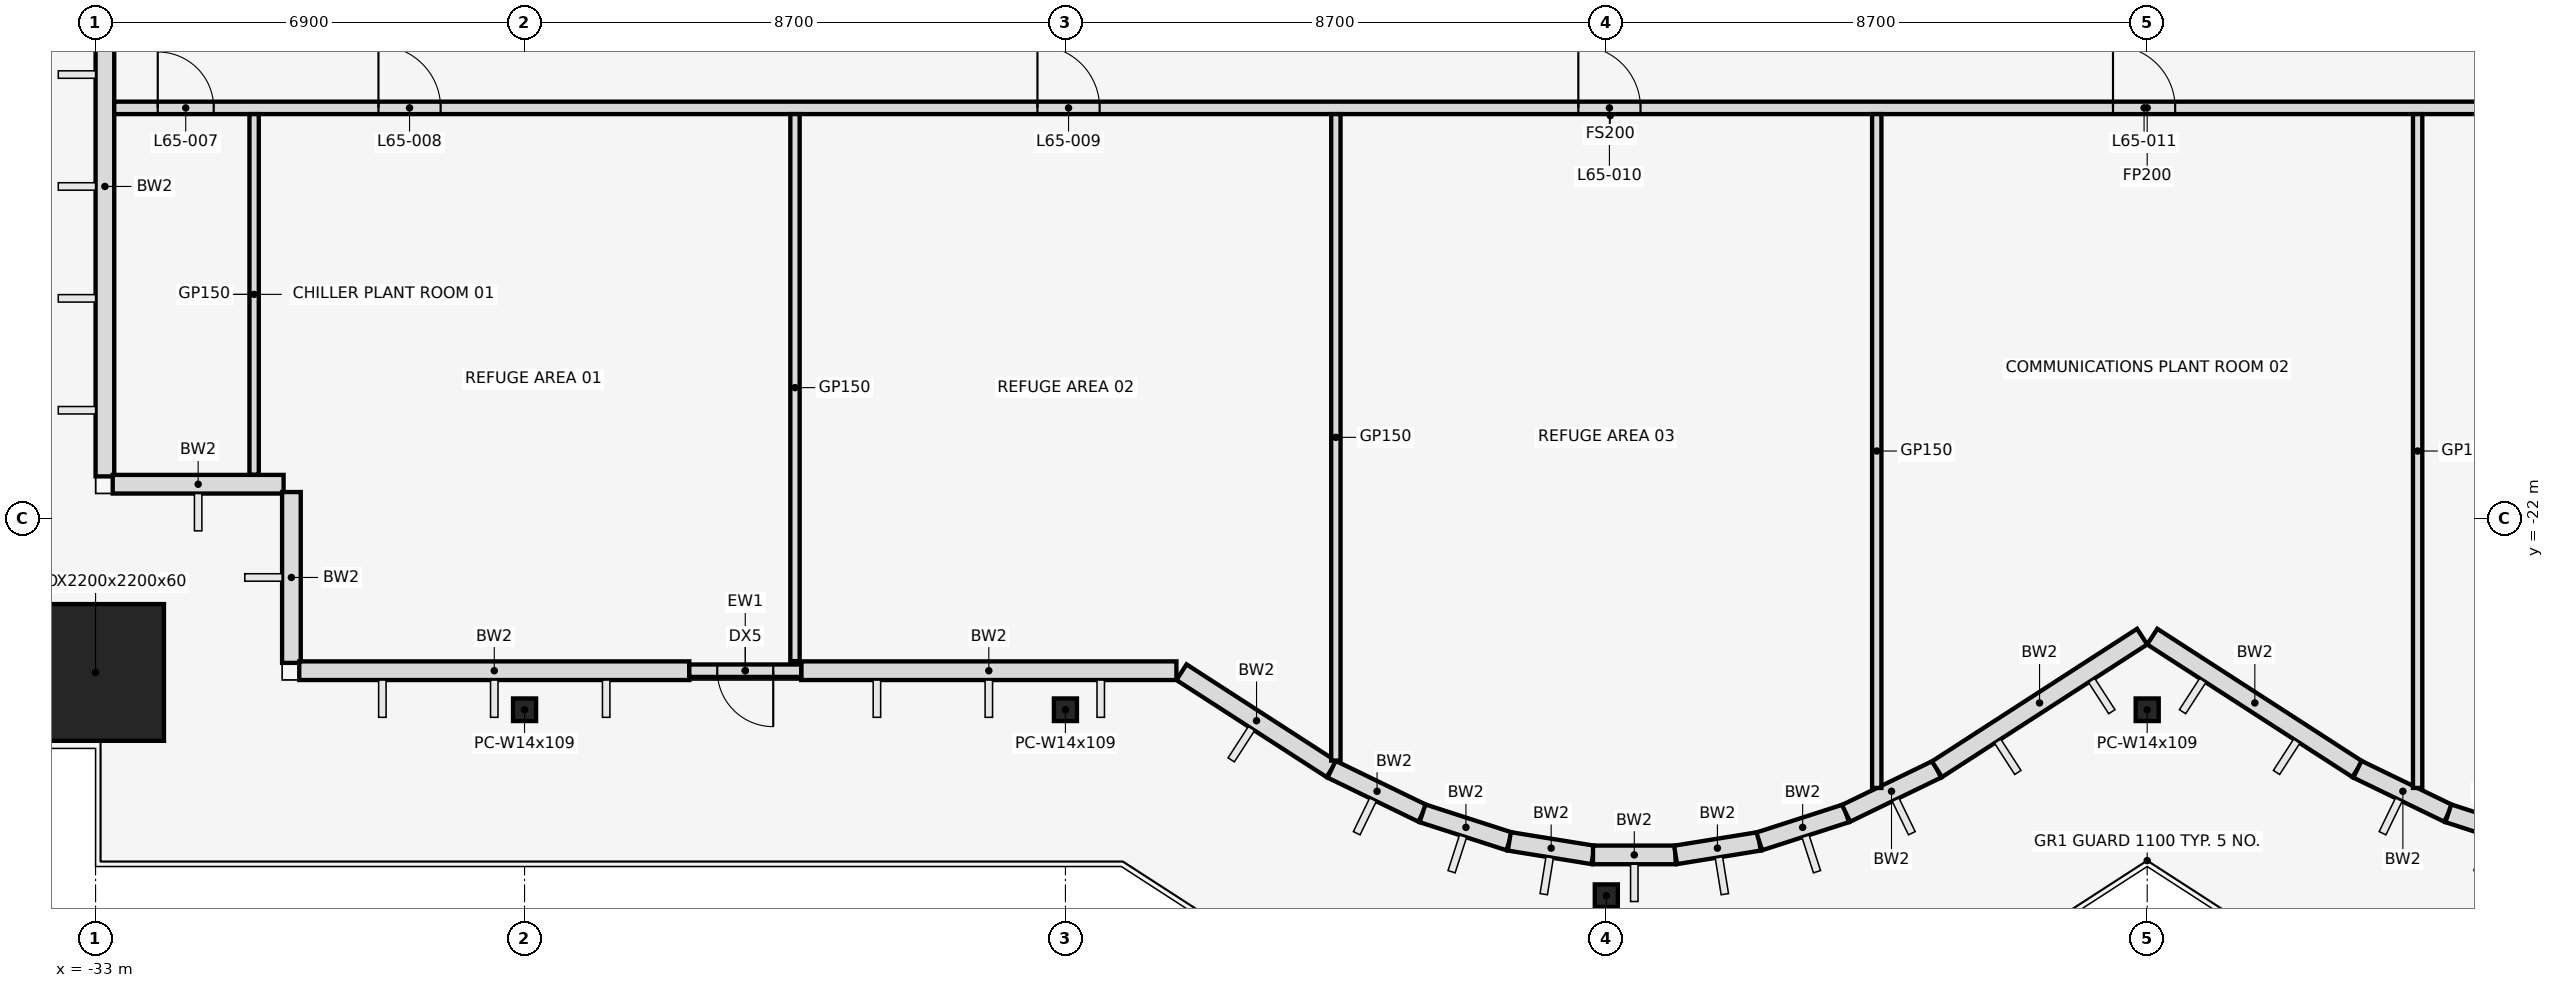
"""IFC4 building model, lengths in metres.
Left out: names, types, materials, properties, quantities, classifications, styles, units other than length and angle.
Written with IfcOpenShell. Run it as: python <this file> out.ifc"""

import sys

from ifc_helpers import new_model, si_unit, direction, frame, frame_2d, origin, origin_2d, place, context, subcontext, project, spatial, rectangle, hollow_rectangle, i_section, extrude, element, fill, save


model = new_model("IFC4")
c1 = context("Model", 3, precision=1e-05, world=origin(), true_north=direction((0.0, 1.0)))
c2 = subcontext(c1, "Body", "Model", "MODEL_VIEW")
j1 = project(units=[si_unit("LENGTHUNIT", "METRE"), si_unit("PLANEANGLEUNIT", "RADIAN")], contexts=[c1])
p1 = place(None, origin())
s1 = spatial("IfcSite", under=j1, at=p1, CompositionType="ELEMENT")
p2 = place(p1, origin())
s2 = spatial("IfcBuilding", under=s1, at=p2, CompositionType="ELEMENT")
p3 = place(p2, frame((0.0, 0.0, 287.6)))
s3 = spatial("IfcBuildingStorey", under=s2, at=p3, CompositionType="ELEMENT", Elevation=287.6)
p4 = place(p3, frame((-33.0, -24.482, 0.0), z_axis=(0.0, 0.0, 1.0), x_axis=(1.0, 0.0, 0.0)))
e1 = element("IfcColumn", 1, at=p4, inside=s3, PredefinedType="COLUMN", context=c2, shape_type="SweptSolid", body=[
    extrude(hollow_rectangle(XDim=2.2, YDim=2.2, WallThickness=0.06, at=origin_2d()), origin(), (0.0, 0.0, 1.0), 5.4),
])
for number, where, z_axis, x_axis in (
    (2, (-26.1, -25.082, 0.0), (0.0, 0.0, 1.0), (1.0, 0.0, 0.0)),
    (3, (-17.4, -25.082, 0.0), (0.0, 0.0, 1.0), (1.0, 0.0, 0.0)),
    (4, (-8.7, -28.073, 0.0), (0.0, 0.0, 1.0), (1.0, 0.0, 0.0)),
    (5, (0.0, -25.082, 0.0), (0.0, 0.0, 1.0), (1.0, 0.0, 0.0)),
):
    element("IfcColumn", number, at=place(p3, frame(where, z_axis=z_axis, x_axis=x_axis)), inside=s3, PredefinedType="COLUMN", context=c2, shape_type="SweptSolid", body=[
        extrude(i_section(OverallWidth=0.371, OverallDepth=0.363, WebThickness=0.013, FlangeThickness=0.022, at=origin_2d()), origin(), (0.0, 0.0, 1.0), 5.4),
    ])
p5 = place(p3, frame((-32.85, -12.0, 0.0), z_axis=(0.0, 0.0, 1.0), x_axis=(0.0, -1.0, 0.0)))
e6 = element("IfcWall", 6, at=p5, inside=s3, PredefinedType="STANDARD", context=c2, shape_type="SweptSolid", body=[
    extrude(rectangle(XDim=9.328, YDim=0.3, at=frame_2d((4.664, 0.0))), origin(), (0.0, 0.0, 1.0), 4.338),
])
for number, where, z_axis, x_axis in (
    (7, (-32.724, -21.454, 0.0), (0.0, 0.0, 1.0), (1.0, 0.0, 0.0)),
    (8, (-29.85, -21.58, 0.0), (0.0, 0.0, 1.0), (0.0, -1.0, 0.0)),
):
    element("IfcWall", number, at=place(p3, frame(where, z_axis=z_axis, x_axis=x_axis)), inside=s3, PredefinedType="STANDARD", context=c2, shape_type="SweptSolid", body=[
        extrude(rectangle(XDim=2.748, YDim=0.3, at=frame_2d((1.374, 0.0))), origin(), (0.0, 0.0, 1.0), 4.65),
    ])
p6 = place(p3, frame((-29.724, -24.454, 0.0), z_axis=(0.0, 0.0, 1.0), x_axis=(1.0, 0.0, 0.0)))
e9 = element("IfcWall", 9, at=p6, inside=s3, PredefinedType="STANDARD", context=c2, shape_type="SweptSolid", body=[
    extrude(rectangle(XDim=6.274, YDim=0.3, at=frame_2d((3.137, 0.0))), origin(), (0.0, 0.0, 1.0), 4.65),
])
p7 = place(p3, frame((-21.65, -24.454, 0.0), z_axis=(0.0, 0.0, 1.0), x_axis=(1.0, 0.0, 0.0)))
e10 = element("IfcWall", 10, at=p7, inside=s3, PredefinedType="STANDARD", context=c2, shape_type="SweptSolid", body=[
    extrude(rectangle(XDim=6.035, YDim=0.3, at=frame_2d((3.018, 0.0))), origin(), (0.0, 0.0, 1.0), 4.65),
])
p8 = place(p3, frame((-15.533, -24.478, 0.0), z_axis=(0.0, 0.0, 1.0), x_axis=(0.839779682339, -0.542927329512, 0.0)))
e11 = element("IfcWall", 11, at=p8, inside=s3, PredefinedType="STANDARD", context=c2, shape_type="SweptSolid", body=[
    extrude(rectangle(XDim=2.875, YDim=0.3, at=frame_2d((1.438, 0.0))), origin(), (0.0, 0.0, 1.0), 4.572),
])
p9 = place(p3, frame((-13.119, -26.039, 0.0), z_axis=(0.0, 0.0, 1.0), x_axis=(0.899798026589, -0.436306671214, 0.0)))
e12 = element("IfcWall", 12, at=p9, inside=s3, PredefinedType="STANDARD", context=c2, shape_type="SweptSolid", body=[
    extrude(rectangle(XDim=1.625, YDim=0.3, at=frame_2d((0.813, 0.0))), origin(), (0.0, 0.0, 1.0), 4.572),
])
p10 = place(p3, frame((-11.656, -26.748, 0.0), z_axis=(0.0, 0.0, 1.0), x_axis=(0.951539081691, -0.307527845919, 0.0)))
e13 = element("IfcWall", 13, at=p10, inside=s3, PredefinedType="STANDARD", context=c2, shape_type="SweptSolid", body=[
    extrude(rectangle(XDim=1.467, YDim=0.3, at=frame_2d((0.733, 0.0))), origin(), (0.0, 0.0, 1.0), 5.25),
])
p11 = place(p3, frame((-10.26, -27.199, 0.0), z_axis=(0.0, 0.0, 1.0), x_axis=(0.987194777017, -0.15951950423, 0.0)))
e14 = element("IfcWall", 14, at=p11, inside=s3, PredefinedType="STANDARD", context=c2, shape_type="SweptSolid", body=[
    extrude(rectangle(XDim=1.364, YDim=0.3, at=frame_2d((0.682, 0.0))), origin(), (0.0, 0.0, 1.0), 5.25),
])
p12 = place(p3, frame((-8.914, -27.417, 0.0), z_axis=(0.0, 0.0, 1.0), x_axis=(1.0, 0.0, 0.0)))
e15 = element("IfcWall", 15, at=p12, inside=s3, PredefinedType="STANDARD", context=c2, shape_type="SweptSolid", body=[
    extrude(rectangle(XDim=1.328, YDim=0.3, at=frame_2d((0.664, 0.0))), origin(), (0.0, 0.0, 1.0), 5.25),
])
p13 = place(p3, frame((-7.586, -27.417, 0.0), z_axis=(0.0, 0.0, 1.0), x_axis=(0.987194777017, 0.15951950423, 0.0)))
e16 = element("IfcWall", 16, at=p13, inside=s3, PredefinedType="STANDARD", context=c2, shape_type="SweptSolid", body=[
    extrude(rectangle(XDim=1.364, YDim=0.3, at=frame_2d((0.682, 0.0))), origin(), (0.0, 0.0, 1.0), 5.25),
])
p14 = place(p3, frame((-6.24, -27.199, 0.0), z_axis=(0.0, 0.0, 1.0), x_axis=(0.951539081691, 0.307527845919, 0.0)))
e17 = element("IfcWall", 17, at=p14, inside=s3, PredefinedType="STANDARD", context=c2, shape_type="SweptSolid", body=[
    extrude(rectangle(XDim=1.467, YDim=0.3, at=frame_2d((0.733, 0.0))), origin(), (0.0, 0.0, 1.0), 5.25),
])
p15 = place(p3, frame((-4.844, -26.748, 0.0), z_axis=(0.0, 0.0, 1.0), x_axis=(0.899798026589, 0.436306671214, 0.0)))
e18 = element("IfcWall", 18, at=p15, inside=s3, PredefinedType="STANDARD", context=c2, shape_type="SweptSolid", body=[
    extrude(rectangle(XDim=1.625, YDim=0.3, at=frame_2d((0.813, 0.0))), origin(), (0.0, 0.0, 1.0), 4.572),
])
for number, where, z_axis, x_axis in (
    (19, (-3.381, -26.039, 0.0), (0.0, 0.0, 1.0), (0.84, 0.543, 0.0)),
    (20, (0.081, -23.906, 0.0), (0.0, 0.0, 1.0), (0.84, -0.543, 0.0)),
):
    element("IfcWall", number, at=place(p3, frame(where, z_axis=z_axis, x_axis=x_axis)), inside=s3, PredefinedType="STANDARD", context=c2, shape_type="SweptSolid", body=[
        extrude(rectangle(XDim=3.929, YDim=0.3, at=frame_2d((1.965, 0.0))), origin(), (0.0, 0.0, 1.0), 4.65),
    ])
p16 = place(p3, frame((3.381, -26.039, 0.0), z_axis=(0.0, 0.0, 1.0), x_axis=(0.899798026589, -0.436306671214, 0.0)))
e21 = element("IfcWall", 21, at=p16, inside=s3, PredefinedType="STANDARD", context=c2, shape_type="SweptSolid", body=[
    extrude(rectangle(XDim=1.625, YDim=0.3, at=frame_2d((0.813, 0.0))), origin(), (0.0, 0.0, 1.0), 4.572),
])
p17 = place(p3, frame((4.844, -26.748, 0.0), z_axis=(0.0, 0.0, 1.0), x_axis=(0.951539081691, -0.307527845919, 0.0)))
e22 = element("IfcWall", 22, at=p17, inside=s3, PredefinedType="STANDARD", context=c2, shape_type="SweptSolid", body=[
    extrude(rectangle(XDim=1.467, YDim=0.3, at=frame_2d((0.733, 0.0))), origin(), (0.0, 0.0, 1.0), 5.25),
])
p18 = place(p3, frame((-21.65, -24.454, 0.0), z_axis=(0.0, 0.0, 1.0), x_axis=(-1.0, 0.0, 0.0)))
e23 = element("IfcWall", 23, at=p18, inside=s3, PredefinedType="STANDARD", context=c2, shape_type="SweptSolid", body=[
    extrude(rectangle(XDim=1.8, YDim=0.2, at=frame_2d((0.9, 0.0))), origin(), (0.0, 0.0, 1.0), 5.25),
])
p19 = place(p18, frame((0.45, 0.0, 0.0)))
e24 = element("IfcOpeningElement", 24, at=p19, cuts=e23, PredefinedType="OPENING", context=c2, shape_type="SweptSolid", body=[
    extrude(rectangle(XDim=0.9, YDim=2.1, at=frame_2d((0.45, 1.05))), frame((0.0, 0.112, 0.0), z_axis=(0.0, -1.0, 0.0), x_axis=(1.0, 0.0, 0.0)), (0.0, 0.0, 1.0), 0.224),
])
p20 = place(p3, frame((-32.7, -15.4, 0.0), z_axis=(0.0, 0.0, 1.0), x_axis=(1.0, 0.0, 0.0)))
e25 = element("IfcWall", 25, at=p20, inside=s3, PredefinedType="PARTITIONING", context=c2, shape_type="SweptSolid", body=[
    extrude(rectangle(XDim=65.4, YDim=0.2, at=frame_2d((32.7, 0.0))), origin(), (0.0, 0.0, 1.0), 4.318),
])
p21 = place(p20, frame((0.7, 0.0, 0.0)))
e26 = element("IfcOpeningElement", 26, at=p21, cuts=e25, PredefinedType="OPENING", context=c2, shape_type="SweptSolid", body=[
    extrude(rectangle(XDim=0.9, YDim=2.1, at=frame_2d((0.45, 1.05))), frame((0.0, 0.112, 0.0), z_axis=(0.0, -1.0, 0.0), x_axis=(1.0, 0.0, 0.0)), (0.0, 0.0, 1.0), 0.224),
])
p22 = place(p20, frame((4.25, 0.0, 0.0)))
e27 = element("IfcOpeningElement", 27, at=p22, cuts=e25, PredefinedType="OPENING", context=c2, shape_type="SweptSolid", body=[
    extrude(rectangle(XDim=1.0, YDim=2.1, at=frame_2d((0.5, 1.05))), frame((0.0, 0.112, 0.0), z_axis=(0.0, -1.0, 0.0), x_axis=(1.0, 0.0, 0.0)), (0.0, 0.0, 1.0), 0.224),
])
p23 = place(p20, frame((14.85, 0.0, 0.0)))
e28 = element("IfcOpeningElement", 28, at=p23, cuts=e25, PredefinedType="OPENING", context=c2, shape_type="SweptSolid", body=[
    extrude(rectangle(XDim=1.0, YDim=2.1, at=frame_2d((0.5, 1.05))), frame((0.0, 0.112, 0.0), z_axis=(0.0, -1.0, 0.0), x_axis=(1.0, 0.0, 0.0)), (0.0, 0.0, 1.0), 0.224),
])
p24 = place(p20, frame((23.55, 0.0, 0.0)))
e29 = element("IfcOpeningElement", 29, at=p24, cuts=e25, PredefinedType="OPENING", context=c2, shape_type="SweptSolid", body=[
    extrude(rectangle(XDim=1.0, YDim=2.1, at=frame_2d((0.5, 1.05))), frame((0.0, 0.112, 0.0), z_axis=(0.0, -1.0, 0.0), x_axis=(1.0, 0.0, 0.0)), (0.0, 0.0, 1.0), 0.224),
])
p25 = place(p20, frame((32.15, 0.0, 0.0)))
e30 = element("IfcOpeningElement", 30, at=p25, cuts=e25, PredefinedType="OPENING", context=c2, shape_type="SweptSolid", body=[
    extrude(rectangle(XDim=1.0, YDim=2.1, at=frame_2d((0.5, 1.05))), frame((0.0, 0.112, 0.0), z_axis=(0.0, -1.0, 0.0), x_axis=(1.0, 0.0, 0.0)), (0.0, 0.0, 1.0), 0.224),
])
p26 = place(p20, frame((40.95, 0.0, 0.0)))
e31 = element("IfcOpeningElement", 31, at=p26, cuts=e25, PredefinedType="OPENING", context=c2, shape_type="SweptSolid", body=[
    extrude(rectangle(XDim=1.0, YDim=2.1, at=frame_2d((0.5, 1.05))), frame((0.0, 0.112, 0.0), z_axis=(0.0, -1.0, 0.0), x_axis=(1.0, 0.0, 0.0)), (0.0, 0.0, 1.0), 0.224),
])
p27 = place(p20, frame((49.65, 0.0, 0.0)))
e32 = element("IfcOpeningElement", 32, at=p27, cuts=e25, PredefinedType="OPENING", context=c2, shape_type="SweptSolid", body=[
    extrude(rectangle(XDim=0.9, YDim=2.1, at=frame_2d((0.45, 1.05))), frame((0.0, 0.112, 0.0), z_axis=(0.0, -1.0, 0.0), x_axis=(1.0, 0.0, 0.0)), (0.0, 0.0, 1.0), 0.224),
])
p28 = place(p20, frame((60.15, 0.0, 0.0)))
e33 = element("IfcOpeningElement", 33, at=p28, cuts=e25, PredefinedType="OPENING", context=c2, shape_type="SweptSolid", body=[
    extrude(rectangle(XDim=1.0, YDim=2.1, at=frame_2d((0.5, 1.05))), frame((0.0, 0.112, 0.0), z_axis=(0.0, -1.0, 0.0), x_axis=(1.0, 0.0, 0.0)), (0.0, 0.0, 1.0), 0.224),
])
p29 = place(p20, frame((63.85, 0.0, 0.0)))
e34 = element("IfcOpeningElement", 34, at=p29, cuts=e25, PredefinedType="OPENING", context=c2, shape_type="SweptSolid", body=[
    extrude(rectangle(XDim=0.9, YDim=2.1, at=frame_2d((0.45, 1.05))), frame((0.0, 0.112, 0.0), z_axis=(0.0, -1.0, 0.0), x_axis=(1.0, 0.0, 0.0)), (0.0, 0.0, 1.0), 0.224),
])
p30 = place(p3, frame((-30.45, -21.3, 0.0), z_axis=(0.0, 0.0, 1.0), x_axis=(0.0, 1.0, 0.0)))
e35 = element("IfcWall", 35, at=p30, inside=s3, PredefinedType="PARTITIONING", context=c2, shape_type="SweptSolid", body=[
    extrude(rectangle(XDim=5.8, YDim=0.15, at=frame_2d((2.9, 0.0))), origin(), (0.0, 0.0, 1.0), 4.318),
])
p31 = place(p3, frame((-21.75, -24.3, 0.0), z_axis=(0.0, 0.0, 1.0), x_axis=(0.0, 1.0, 0.0)))
e36 = element("IfcWall", 36, at=p31, inside=s3, PredefinedType="PARTITIONING", context=c2, shape_type="SweptSolid", body=[
    extrude(rectangle(XDim=8.8, YDim=0.15, at=frame_2d((4.4, 0.0))), origin(), (0.0, 0.0, 1.0), 4.318),
])
p32 = place(p3, frame((-13.05, -25.9, 0.0), z_axis=(0.0, 0.0, 1.0), x_axis=(0.0, 1.0, 0.0)))
e37 = element("IfcWall", 37, at=p32, inside=s3, PredefinedType="PARTITIONING", context=c2, shape_type="SweptSolid", body=[
    extrude(rectangle(XDim=10.4, YDim=0.15, at=frame_2d((5.2, 0.0))), origin(), (0.0, 0.0, 1.0), 4.318),
])
for number, where, z_axis, x_axis in (
    (38, (-4.35, -26.34, 0.0), (0.0, 0.0, 1.0), (0.0, 1.0, 0.0)),
    (39, (4.35, -26.34, 0.0), (0.0, 0.0, 1.0), (0.0, 1.0, 0.0)),
):
    element("IfcWall", number, at=place(p3, frame(where, z_axis=z_axis, x_axis=x_axis)), inside=s3, PredefinedType="PARTITIONING", context=c2, shape_type="SweptSolid", body=[
        extrude(rectangle(XDim=10.84, YDim=0.15, at=frame_2d((5.42, 0.0))), origin(), (0.0, 0.0, 1.0), 4.318),
    ])
p33 = place(p19, origin())
e40 = element("IfcDoor", 40, at=p33, inside=s3, OperationType="SINGLE_SWING_LEFT", PredefinedType="DOOR", context=c2, shape_type="SweptSolid", body=[
    extrude(rectangle(XDim=0.9, YDim=2.1, at=frame_2d((0.45, 1.05))), frame((0.0, 0.025, 0.0), z_axis=(0.0, -1.0, 0.0), x_axis=(1.0, 0.0, 0.0)), (0.0, 0.0, 1.0), 0.05),
])
fill(e24, e40)
p34 = place(p21, frame((0.9, 0.0, 0.0), z_axis=(0.0, 0.0, 1.0), x_axis=(-1.0, 0.0, 0.0)))
e41 = element("IfcDoor", 41, at=p34, inside=s3, OperationType="SINGLE_SWING_LEFT", PredefinedType="DOOR", context=c2, shape_type="SweptSolid", body=[
    extrude(rectangle(XDim=0.9, YDim=2.1, at=frame_2d((0.45, 1.05))), frame((0.0, 0.025, 0.0), z_axis=(0.0, -1.0, 0.0), x_axis=(1.0, 0.0, 0.0)), (0.0, 0.0, 1.0), 0.05),
])
fill(e26, e41)
p35 = place(p22, frame((1.0, 0.0, 0.0), z_axis=(0.0, 0.0, 1.0), x_axis=(-1.0, 0.0, 0.0)))
e42 = element("IfcDoor", 42, at=p35, inside=s3, OperationType="SINGLE_SWING_RIGHT", PredefinedType="DOOR", context=c2, shape_type="SweptSolid", body=[
    extrude(rectangle(XDim=1.0, YDim=2.1, at=frame_2d((0.5, 1.05))), frame((0.0, 0.025, 0.0), z_axis=(0.0, -1.0, 0.0), x_axis=(1.0, 0.0, 0.0)), (0.0, 0.0, 1.0), 0.05),
])
fill(e27, e42)
p36 = place(p23, frame((1.0, 0.0, 0.0), z_axis=(0.0, 0.0, 1.0), x_axis=(-1.0, 0.0, 0.0)))
e43 = element("IfcDoor", 43, at=p36, inside=s3, OperationType="SINGLE_SWING_RIGHT", PredefinedType="DOOR", context=c2, shape_type="SweptSolid", body=[
    extrude(rectangle(XDim=1.0, YDim=2.1, at=frame_2d((0.5, 1.05))), frame((0.0, 0.025, 0.0), z_axis=(0.0, -1.0, 0.0), x_axis=(1.0, 0.0, 0.0)), (0.0, 0.0, 1.0), 0.05),
])
fill(e28, e43)
p37 = place(p24, frame((1.0, 0.0, 0.0), z_axis=(0.0, 0.0, 1.0), x_axis=(-1.0, 0.0, 0.0)))
e44 = element("IfcDoor", 44, at=p37, inside=s3, OperationType="SINGLE_SWING_LEFT", PredefinedType="DOOR", context=c2, shape_type="SweptSolid", body=[
    extrude(rectangle(XDim=1.0, YDim=2.1, at=frame_2d((0.5, 1.05))), frame((0.0, 0.025, 0.0), z_axis=(0.0, -1.0, 0.0), x_axis=(1.0, 0.0, 0.0)), (0.0, 0.0, 1.0), 0.05),
])
fill(e29, e44)
p38 = place(p25, frame((1.0, 0.0, 0.0), z_axis=(0.0, 0.0, 1.0), x_axis=(-1.0, 0.0, 0.0)))
e45 = element("IfcDoor", 45, at=p38, inside=s3, OperationType="SINGLE_SWING_RIGHT", PredefinedType="DOOR", context=c2, shape_type="SweptSolid", body=[
    extrude(rectangle(XDim=1.0, YDim=2.1, at=frame_2d((0.5, 1.05))), frame((0.0, 0.025, 0.0), z_axis=(0.0, -1.0, 0.0), x_axis=(1.0, 0.0, 0.0)), (0.0, 0.0, 1.0), 0.05),
])
fill(e30, e45)
save(model, sys.argv[1])
